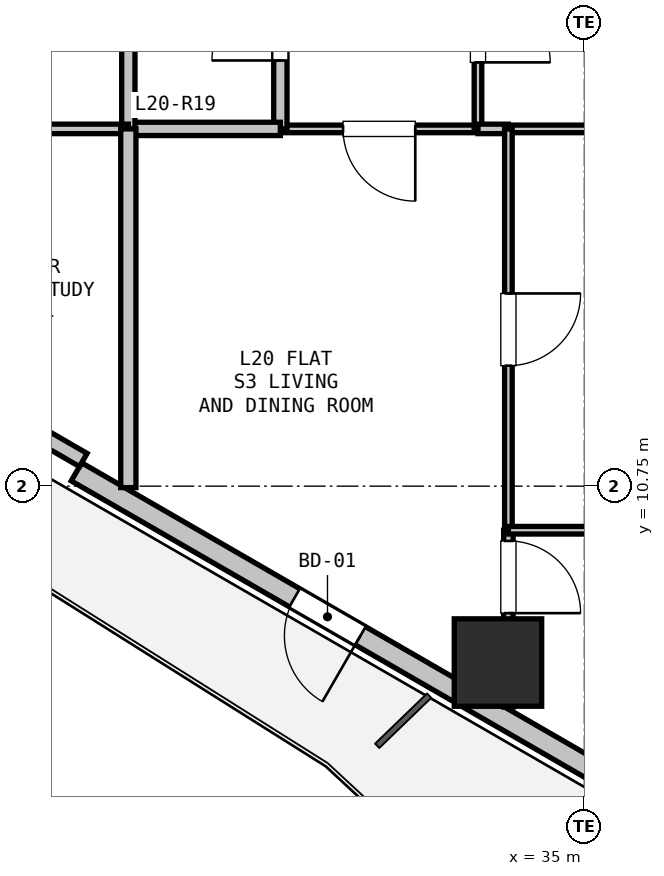
"""IFC4 building model, lengths in metres.
Left out: names, types, materials, properties, quantities, classifications, styles, units other than length and angle.
Written with IfcOpenShell. Run it as: python <this file> out.ifc"""

import sys

from ifc_helpers import new_model, si_unit, direction, frame, frame_2d, origin, origin_2d, place, context, subcontext, project, spatial, rectangle, hollow_rectangle, extrude, element, fill, save


model = new_model("IFC4")
c1 = context("Model", 3, precision=1e-05, world=origin(), true_north=direction((0.0, 1.0)))
c2 = subcontext(c1, "Body", "Model", "MODEL_VIEW")
j1 = project(units=[si_unit("LENGTHUNIT", "METRE"), si_unit("PLANEANGLEUNIT", "RADIAN")], contexts=[c1])
p1 = place(None, origin())
s1 = spatial("IfcSite", under=j1, at=p1, CompositionType="ELEMENT")
p2 = place(p1, origin())
s2 = spatial("IfcBuilding", under=s1, at=p2, CompositionType="ELEMENT")
p3 = place(p2, frame((0.0, 0.0, 76.8)))
s3 = spatial("IfcBuildingStorey", under=s2, at=p3, CompositionType="ELEMENT", Elevation=76.8)
p4 = place(p3, frame((33.863, 8.429, 0.0), z_axis=(0.0, 0.0, 1.0), x_axis=(1.0, 0.0, 0.0)))
e1 = element("IfcColumn", 1, at=p4, inside=s3, PredefinedType="COLUMN", context=c2, shape_type="SweptSolid", body=[
    extrude(hollow_rectangle(XDim=1.15, YDim=1.15, WallThickness=0.032, at=origin_2d()), origin(), (0.0, 0.0, 1.0), 3.3),
])
p5 = place(p3, frame((38.649, 4.973, 0.0), z_axis=(0.0, 0.0, 1.0), x_axis=(-0.866023023012, 0.500004123596, 0.0)))
e2 = element("IfcWall", 2, at=p5, inside=s3, PredefinedType="SOLIDWALL", context=c2, shape_type="SweptSolid", body=[
    extrude(rectangle(XDim=11.93, YDim=0.275, at=frame_2d((5.965, 0.0))), origin(), (0.0, 0.0, 1.0), 2.67),
])
p6 = place(p5, frame((7.616, 0.0, 0.0)))
e3 = element("IfcOpeningElement", 3, at=p6, cuts=e2, PredefinedType="OPENING", context=c2, shape_type="SweptSolid", body=[
    extrude(rectangle(XDim=1.0, YDim=2.1, at=frame_2d((0.5, 1.05))), frame((0.0, 0.147, 0.0), z_axis=(0.0, -1.0, 0.0), x_axis=(1.0, 0.0, 0.0)), (0.0, 0.0, 1.0), 0.295),
])
p7 = place(p5, frame((2.207, 0.0, 0.9)))
e4 = element("IfcOpeningElement", 4, at=p7, cuts=e2, PredefinedType="OPENING", context=c2, shape_type="SweptSolid", body=[
    extrude(rectangle(XDim=1.2, YDim=1.4, at=frame_2d((0.6, 0.7))), frame((0.0, 0.147, 0.0), z_axis=(0.0, -1.0, 0.0), x_axis=(1.0, 0.0, 0.0)), (0.0, 0.0, 1.0), 0.295),
])
p8 = place(p3, frame((28.407, 11.094, 0.0), z_axis=(0.0, 0.0, 1.0), x_axis=(-0.86605165483, 0.499954529098, 0.0)))
e5 = element("IfcWall", 5, at=p8, inside=s3, PredefinedType="PARAPET", context=c2, shape_type="SweptSolid", body=[
    extrude(rectangle(XDim=1.7, YDim=0.2, at=frame_2d((0.85, 0.0))), origin(), (0.0, 0.0, 1.0), 2.67),
])
p9 = place(p3, frame((33.6, 15.45, 0.0), z_axis=(0.0, 0.0, 1.0), x_axis=(-1.0, 0.0, 0.0)))
e6 = element("IfcWall", 6, at=p9, inside=s3, PredefinedType="PARTITIONING", context=c2, shape_type="SweptSolid", body=[
    extrude(rectangle(XDim=2.6, YDim=0.1, at=frame_2d((1.3, 0.0))), origin(), (0.0, 0.0, 1.0), 3.05),
])
p10 = place(p9, frame((0.825, 0.0, 0.0)))
e7 = element("IfcOpeningElement", 7, at=p10, cuts=e6, PredefinedType="OPENING", context=c2, shape_type="SweptSolid", body=[
    extrude(rectangle(XDim=0.95, YDim=2.1, at=frame_2d((0.475, 1.05))), frame((0.0, 0.06, 0.0), z_axis=(0.0, -1.0, 0.0), x_axis=(1.0, 0.0, 0.0)), (0.0, 0.0, 1.0), 0.12),
])
p11 = place(p3, frame((31.0, 15.45, 0.0), z_axis=(0.0, 0.0, 1.0), x_axis=(0.0, 1.0, 0.0)))
e8 = element("IfcWall", 8, at=p11, inside=s3, PredefinedType="PLUMBINGWALL", context=c2, shape_type="SweptSolid", body=[
    extrude(rectangle(XDim=2.7, YDim=0.175, at=frame_2d((1.35, 0.0))), origin(), (0.0, 0.0, 1.0), 3.05),
])
p12 = place(p11, frame((0.9, 0.0, 0.0)))
e9 = element("IfcOpeningElement", 9, at=p12, cuts=e8, PredefinedType="OPENING", context=c2, shape_type="SweptSolid", body=[
    extrude(rectangle(XDim=0.9, YDim=2.1, at=frame_2d((0.45, 1.05))), frame((0.0, 0.097, 0.0), z_axis=(0.0, -1.0, 0.0), x_axis=(1.0, 0.0, 0.0)), (0.0, 0.0, 1.0), 0.195),
])
p13 = place(p3, frame((33.6, 18.15, 0.0), z_axis=(0.0, 0.0, 1.0), x_axis=(0.0, -1.0, 0.0)))
e10 = element("IfcWall", 10, at=p13, inside=s3, PredefinedType="PARTITIONING", context=c2, shape_type="SweptSolid", body=[
    extrude(rectangle(XDim=2.7, YDim=0.1, at=frame_2d((1.35, 0.0))), origin(), (0.0, 0.0, 1.0), 3.05),
])
p14 = place(p13, frame((0.875, 0.0, 0.0)))
e11 = element("IfcOpeningElement", 11, at=p14, cuts=e10, PredefinedType="OPENING", context=c2, shape_type="SweptSolid", body=[
    extrude(rectangle(XDim=0.95, YDim=2.1, at=frame_2d((0.475, 1.05))), frame((0.0, 0.06, 0.0), z_axis=(0.0, -1.0, 0.0), x_axis=(1.0, 0.0, 0.0)), (0.0, 0.0, 1.0), 0.12),
])
p15 = place(p3, frame((31.0, 15.45, 0.0), z_axis=(0.0, 0.0, 1.0), x_axis=(-1.0, 0.0, 0.0)))
e12 = element("IfcWall", 12, at=p15, inside=s3, PredefinedType="PLUMBINGWALL", context=c2, shape_type="SweptSolid", body=[
    extrude(rectangle(XDim=2.0, YDim=0.175, at=frame_2d((1.0, 0.0))), origin(), (0.0, 0.0, 1.0), 3.05),
])
p16 = place(p3, frame((29.0, 15.45, 0.0), z_axis=(0.0, 0.0, 1.0), x_axis=(0.0, 1.0, 0.0)))
e13 = element("IfcWall", 13, at=p16, inside=s3, PredefinedType="PLUMBINGWALL", context=c2, shape_type="SweptSolid", body=[
    extrude(rectangle(XDim=2.7, YDim=0.175, at=frame_2d((1.35, 0.0))), origin(), (0.0, 0.0, 1.0), 3.05),
])
p17 = place(p3, frame((42.873, 15.45, 0.0), z_axis=(0.0, 0.0, 1.0), x_axis=(-1.0, 0.0, 0.0)))
e14 = element("IfcWall", 14, at=p17, inside=s3, PredefinedType="PARTITIONING", context=c2, shape_type="SweptSolid", body=[
    extrude(rectangle(XDim=8.873, YDim=0.1, at=frame_2d((4.437, 0.0))), origin(), (0.0, 0.0, 1.0), 2.365),
])
p18 = place(p17, frame((3.962, 0.0, 0.0)))
e15 = element("IfcOpeningElement", 15, at=p18, cuts=e14, PredefinedType="OPENING", context=c2, shape_type="SweptSolid", body=[
    extrude(rectangle(XDim=0.95, YDim=2.1, at=frame_2d((0.475, 1.05))), frame((0.0, 0.06, 0.0), z_axis=(0.0, -1.0, 0.0), x_axis=(1.0, 0.0, 0.0)), (0.0, 0.0, 1.0), 0.12),
])
p19 = place(p3, frame((34.0, 15.45, 0.0), z_axis=(0.0, 0.0, 1.0), x_axis=(-1.0, 0.0, 0.0)))
e16 = element("IfcWall", 16, at=p19, inside=s3, PredefinedType="PARTITIONING", context=c2, shape_type="SweptSolid", body=[
    extrude(rectangle(XDim=0.4, YDim=0.125, at=frame_2d((0.2, 0.0))), origin(), (0.0, 0.0, 1.0), 3.05),
])
p20 = place(p3, frame((27.1, 15.45, 0.0), z_axis=(0.0, 0.0, 1.0), x_axis=(1.0, 0.0, 0.0)))
e17 = element("IfcWall", 17, at=p20, inside=s3, PredefinedType="PARTITIONING", context=c2, shape_type="SweptSolid", body=[
    extrude(rectangle(XDim=1.9, YDim=0.125, at=frame_2d((0.95, 0.0))), origin(), (0.0, 0.0, 1.0), 3.05),
])
p21 = place(p3, frame((29.0, 15.45, 0.0), z_axis=(0.0, 0.0, 1.0), x_axis=(0.0, -1.0, 0.0)))
e18 = element("IfcWall", 18, at=p21, inside=s3, PredefinedType="PARTITIONING", context=c2, shape_type="SweptSolid", body=[
    extrude(rectangle(XDim=4.719, YDim=0.2, at=frame_2d((2.36, 0.0))), origin(), (0.0, 0.0, 1.0), 2.365),
])
p22 = place(p3, frame((34.0, 15.45, 0.0), z_axis=(0.0, 0.0, 1.0), x_axis=(0.0, -1.0, 0.0)))
e19 = element("IfcWall", 19, at=p22, inside=s3, PredefinedType="PARTITIONING", context=c2, shape_type="SweptSolid", body=[
    extrude(rectangle(XDim=5.28, YDim=0.1, at=frame_2d((2.64, 0.0))), origin(), (0.0, 0.0, 1.0), 3.05),
])
p23 = place(p22, frame((2.165, 0.0, 0.0)))
e20 = element("IfcOpeningElement", 20, at=p23, cuts=e19, PredefinedType="OPENING", context=c2, shape_type="SweptSolid", body=[
    extrude(rectangle(XDim=0.95, YDim=2.1, at=frame_2d((0.475, 1.05))), frame((0.0, 0.06, 0.0), z_axis=(0.0, -1.0, 0.0), x_axis=(1.0, 0.0, 0.0)), (0.0, 0.0, 1.0), 0.12),
])
p24 = place(p3, frame((34.0, 10.17, 0.0), z_axis=(0.0, 0.0, 1.0), x_axis=(0.0, -1.0, 0.0)))
e21 = element("IfcWall", 21, at=p24, inside=s3, PredefinedType="PARTITIONING", context=c2, shape_type="SweptSolid", body=[
    extrude(rectangle(XDim=2.326, YDim=0.125, at=frame_2d((1.163, 0.0))), origin(), (0.0, 0.0, 1.0), 3.05),
])
p25 = place(p24, frame((0.141, 0.0, 0.0)))
e22 = element("IfcOpeningElement", 22, at=p25, cuts=e21, PredefinedType="OPENING", context=c2, shape_type="SweptSolid", body=[
    extrude(rectangle(XDim=0.95, YDim=2.1, at=frame_2d((0.475, 1.05))), frame((0.0, 0.073, 0.0), z_axis=(0.0, -1.0, 0.0), x_axis=(1.0, 0.0, 0.0)), (0.0, 0.0, 1.0), 0.145),
])
p26 = place(p3, frame((34.0, 10.17, 0.0), z_axis=(0.0, 0.0, 1.0), x_axis=(1.0, 0.0, 0.0)))
e23 = element("IfcWall", 23, at=p26, inside=s3, PredefinedType="PARTITIONING", context=c2, shape_type="SweptSolid", body=[
    extrude(rectangle(XDim=8.873, YDim=0.1, at=frame_2d((4.437, 0.0))), origin(), (0.0, 0.0, 1.0), 2.423),
])
p27 = place(p26, frame((3.962, 0.0, 0.0)))
e24 = element("IfcOpeningElement", 24, at=p27, cuts=e23, PredefinedType="OPENING", context=c2, shape_type="SweptSolid", body=[
    extrude(rectangle(XDim=0.95, YDim=2.1, at=frame_2d((0.475, 1.05))), frame((0.0, 0.06, 0.0), z_axis=(0.0, -1.0, 0.0), x_axis=(1.0, 0.0, 0.0)), (0.0, 0.0, 1.0), 0.12),
])
p28 = place(p6, origin())
e25 = element("IfcDoor", 25, at=p28, inside=s3, OperationType="SINGLE_SWING_LEFT", PredefinedType="DOOR", context=c2, shape_type="SweptSolid", body=[
    extrude(rectangle(XDim=1.0, YDim=2.1, at=frame_2d((0.5, 1.05))), frame((0.0, 0.025, 0.0), z_axis=(0.0, -1.0, 0.0), x_axis=(1.0, 0.0, 0.0)), (0.0, 0.0, 1.0), 0.05),
])
fill(e3, e25)
p29 = place(p12, origin())
e26 = element("IfcDoor", 26, at=p29, inside=s3, OperationType="SINGLE_SWING_LEFT", PredefinedType="DOOR", context=c2, shape_type="SweptSolid", body=[
    extrude(rectangle(XDim=0.9, YDim=2.1, at=frame_2d((0.45, 1.05))), frame((0.0, 0.025, 0.0), z_axis=(0.0, -1.0, 0.0), x_axis=(1.0, 0.0, 0.0)), (0.0, 0.0, 1.0), 0.05),
])
fill(e9, e26)
p30 = place(p14, origin())
e27 = element("IfcDoor", 27, at=p30, inside=s3, OperationType="SINGLE_SWING_RIGHT", PredefinedType="DOOR", context=c2, shape_type="SweptSolid", body=[
    extrude(rectangle(XDim=0.95, YDim=2.1, at=frame_2d((0.475, 1.05))), frame((0.0, 0.025, 0.0), z_axis=(0.0, -1.0, 0.0), x_axis=(1.0, 0.0, 0.0)), (0.0, 0.0, 1.0), 0.05),
])
fill(e11, e27)
p31 = place(p10, origin())
e28 = element("IfcDoor", 28, at=p31, inside=s3, OperationType="SINGLE_SWING_LEFT", PredefinedType="DOOR", context=c2, shape_type="SweptSolid", body=[
    extrude(rectangle(XDim=0.95, YDim=2.1, at=frame_2d((0.475, 1.05))), frame((0.0, 0.025, 0.0), z_axis=(0.0, -1.0, 0.0), x_axis=(1.0, 0.0, 0.0)), (0.0, 0.0, 1.0), 0.05),
])
fill(e7, e28)
p32 = place(p25, origin())
e29 = element("IfcDoor", 29, at=p32, inside=s3, OperationType="SINGLE_SWING_RIGHT", PredefinedType="DOOR", context=c2, shape_type="SweptSolid", body=[
    extrude(rectangle(XDim=0.95, YDim=2.1, at=frame_2d((0.475, 1.05))), frame((0.0, 0.025, 0.0), z_axis=(0.0, -1.0, 0.0), x_axis=(1.0, 0.0, 0.0)), (0.0, 0.0, 1.0), 0.05),
])
fill(e22, e29)
p33 = place(p23, origin())
e30 = element("IfcDoor", 30, at=p33, inside=s3, OperationType="SINGLE_SWING_LEFT", PredefinedType="DOOR", context=c2, shape_type="SweptSolid", body=[
    extrude(rectangle(XDim=0.95, YDim=2.1, at=frame_2d((0.475, 1.05))), frame((0.0, 0.025, 0.0), z_axis=(0.0, -1.0, 0.0), x_axis=(1.0, 0.0, 0.0)), (0.0, 0.0, 1.0), 0.05),
])
fill(e20, e30)
save(model, sys.argv[1])
